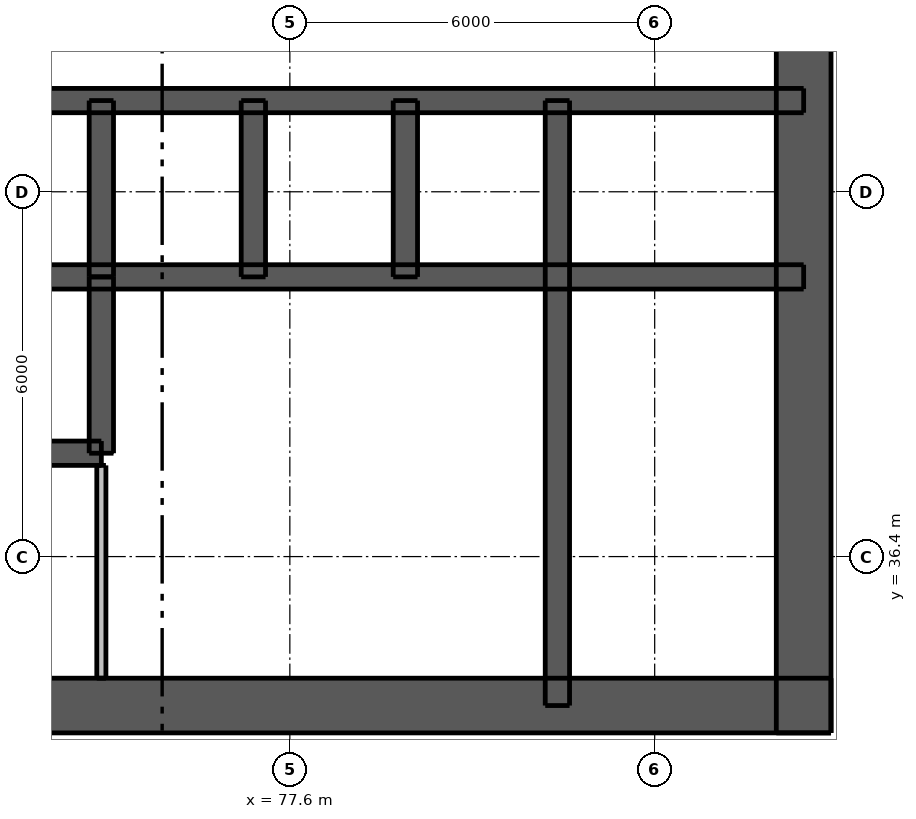
"""IFC4 building model, lengths in metres.
Left out: names, types, materials, properties, quantities, classifications, styles, units other than length and angle.
Written with IfcOpenShell. Run it as: python <this file> out.ifc"""

import sys

from ifc_helpers import new_model, si_unit, direction, frame, frame_2d, origin, place, context, subcontext, project, spatial, rectangle, extrude, element, fill, save


model = new_model("IFC4")
c1 = context("Model", 3, precision=1e-05, world=origin(), true_north=direction((0.0, 1.0)))
c2 = subcontext(c1, "Body", "Model", "MODEL_VIEW")
j1 = project(units=[si_unit("LENGTHUNIT", "METRE"), si_unit("PLANEANGLEUNIT", "RADIAN")], contexts=[c1])
p1 = place(None, origin())
s1 = spatial("IfcSite", under=j1, at=p1, CompositionType="ELEMENT")
p2 = place(p1, origin())
s2 = spatial("IfcBuilding", under=s1, at=p2, CompositionType="ELEMENT")
p3 = place(p2, frame((0.0, 0.0, 23.5)))
s3 = spatial("IfcBuildingStorey", under=s2, at=p3, CompositionType="ELEMENT", Elevation=23.5)
p4 = place(p3, frame((62.5, 33.95, 0.0), z_axis=(0.0, 0.0, 1.0), x_axis=(1.0, 0.0, 0.0)))
e1 = element("IfcWall", 1, at=p4, inside=s3, PredefinedType="SHEAR", context=c2, shape_type="SweptSolid", body=[
    extrude(rectangle(XDim=24.0, YDim=0.9, at=frame_2d((12.0, 0.0))), origin(), (0.0, 0.0, 1.0), 3.05),
])
p5 = place(p4, frame((2.05, 0.0, 0.0)))
e2 = element("IfcOpeningElement", 2, at=p5, cuts=e1, PredefinedType="OPENING", context=c2, shape_type="SweptSolid", body=[
    extrude(rectangle(XDim=1.1, YDim=2.1, at=frame_2d((0.55, 1.05))), frame((0.0, 0.46, 0.0), z_axis=(0.0, -1.0, 0.0), x_axis=(1.0, 0.0, 0.0)), (0.0, 0.0, 1.0), 0.92),
])
p6 = place(p4, frame((20.85, 0.0, 0.0)))
e3 = element("IfcOpeningElement", 3, at=p6, cuts=e1, PredefinedType="OPENING", context=c2, shape_type="SweptSolid", body=[
    extrude(rectangle(XDim=1.1, YDim=2.1, at=frame_2d((0.55, 1.05))), frame((0.0, 0.46, 0.0), z_axis=(0.0, -1.0, 0.0), x_axis=(1.0, 0.0, 0.0)), (0.0, 0.0, 1.0), 0.92),
])
p7 = place(p4, frame((8.0, 0.0, 0.0)))
e4 = element("IfcOpeningElement", 4, at=p7, cuts=e1, PredefinedType="OPENING", context=c2, shape_type="SweptSolid", body=[
    extrude(rectangle(XDim=1.1, YDim=2.1, at=frame_2d((0.55, 1.05))), frame((0.0, 0.46, 0.0), z_axis=(0.0, -1.0, 0.0), x_axis=(1.0, 0.0, 0.0)), (0.0, 0.0, 1.0), 0.92),
])
p8 = place(p4, frame((15.3, 0.0, 0.0)))
e5 = element("IfcOpeningElement", 5, at=p8, cuts=e1, PredefinedType="OPENING", context=c2, shape_type="SweptSolid", body=[
    extrude(rectangle(XDim=0.9, YDim=2.1, at=frame_2d((0.45, 1.05))), frame((0.0, 0.46, 0.0), z_axis=(0.0, -1.0, 0.0), x_axis=(1.0, 0.0, 0.0)), (0.0, 0.0, 1.0), 0.92),
])
p9 = place(p3, frame((86.05, 33.5, 0.0), z_axis=(0.0, 0.0, 1.0), x_axis=(0.0, 1.0, 0.0)))
e6 = element("IfcWall", 6, at=p9, inside=s3, PredefinedType="SHEAR", context=c2, shape_type="SweptSolid", body=[
    extrude(rectangle(XDim=24.0, YDim=0.9, at=frame_2d((12.0, 0.0))), origin(), (0.0, 0.0, 1.0), 3.05),
])
p10 = place(p9, frame((11.2, 0.0, 0.0)))
e7 = element("IfcOpeningElement", 7, at=p10, cuts=e6, PredefinedType="OPENING", context=c2, shape_type="SweptSolid", body=[
    extrude(rectangle(XDim=1.6, YDim=2.1, at=frame_2d((0.8, 1.05))), frame((0.0, 0.46, 0.0), z_axis=(0.0, -1.0, 0.0), x_axis=(1.0, 0.0, 0.0)), (0.0, 0.0, 1.0), 0.92),
])
p11 = place(p3, frame((62.95, 41.0, 0.0), z_axis=(0.0, 0.0, 1.0), x_axis=(1.0, 0.0, 0.0)))
e8 = element("IfcWall", 8, at=p11, inside=s3, PredefinedType="SHEAR", context=c2, shape_type="SweptSolid", body=[
    extrude(rectangle(XDim=23.1, YDim=0.4, at=frame_2d((11.55, 0.0))), origin(), (0.0, 0.0, 1.0), 3.05),
])
p12 = place(p3, frame((62.95, 43.9, 0.0), z_axis=(0.0, 0.0, 1.0), x_axis=(1.0, 0.0, 0.0)))
e9 = element("IfcWall", 9, at=p12, inside=s3, PredefinedType="SHEAR", context=c2, shape_type="SweptSolid", body=[
    extrude(rectangle(XDim=23.1, YDim=0.4, at=frame_2d((11.55, 0.0))), origin(), (0.0, 0.0, 1.0), 3.05),
])
p13 = place(p12, frame((1.7, 0.0, 0.0)))
e10 = element("IfcOpeningElement", 10, at=p13, cuts=e9, PredefinedType="OPENING", context=c2, shape_type="SweptSolid", body=[
    extrude(rectangle(XDim=0.9, YDim=2.1, at=frame_2d((0.45, 1.05))), frame((0.0, 0.21, 0.0), z_axis=(0.0, -1.0, 0.0), x_axis=(1.0, 0.0, 0.0)), (0.0, 0.0, 1.0), 0.42),
])
p14 = place(p12, frame((20.5, 0.0, 0.0)))
e11 = element("IfcOpeningElement", 11, at=p14, cuts=e9, PredefinedType="OPENING", context=c2, shape_type="SweptSolid", body=[
    extrude(rectangle(XDim=0.9, YDim=2.1, at=frame_2d((0.45, 1.05))), frame((0.0, 0.21, 0.0), z_axis=(0.0, -1.0, 0.0), x_axis=(1.0, 0.0, 0.0)), (0.0, 0.0, 1.0), 0.42),
])
p15 = place(p12, frame((4.75, 0.0, 0.0)))
e12 = element("IfcOpeningElement", 12, at=p15, cuts=e9, PredefinedType="OPENING", context=c2, shape_type="SweptSolid", body=[
    extrude(rectangle(XDim=1.1, YDim=2.1, at=frame_2d((0.55, 1.05))), frame((0.0, 0.21, 0.0), z_axis=(0.0, -1.0, 0.0), x_axis=(1.0, 0.0, 0.0)), (0.0, 0.0, 1.0), 0.42),
])
p16 = place(p12, frame((7.25, 0.0, 0.0)))
e13 = element("IfcOpeningElement", 13, at=p16, cuts=e9, PredefinedType="OPENING", context=c2, shape_type="SweptSolid", body=[
    extrude(rectangle(XDim=1.1, YDim=2.1, at=frame_2d((0.55, 1.05))), frame((0.0, 0.21, 0.0), z_axis=(0.0, -1.0, 0.0), x_axis=(1.0, 0.0, 0.0)), (0.0, 0.0, 1.0), 0.42),
])
p17 = place(p12, frame((9.75, 0.0, 0.0)))
e14 = element("IfcOpeningElement", 14, at=p17, cuts=e9, PredefinedType="OPENING", context=c2, shape_type="SweptSolid", body=[
    extrude(rectangle(XDim=1.1, YDim=2.1, at=frame_2d((0.55, 1.05))), frame((0.0, 0.21, 0.0), z_axis=(0.0, -1.0, 0.0), x_axis=(1.0, 0.0, 0.0)), (0.0, 0.0, 1.0), 0.42),
])
p18 = place(p12, frame((12.25, 0.0, 0.0)))
e15 = element("IfcOpeningElement", 15, at=p18, cuts=e9, PredefinedType="OPENING", context=c2, shape_type="SweptSolid", body=[
    extrude(rectangle(XDim=1.1, YDim=2.1, at=frame_2d((0.55, 1.05))), frame((0.0, 0.21, 0.0), z_axis=(0.0, -1.0, 0.0), x_axis=(1.0, 0.0, 0.0)), (0.0, 0.0, 1.0), 0.42),
])
p19 = place(p12, frame((14.75, 0.0, 0.0)))
e16 = element("IfcOpeningElement", 16, at=p19, cuts=e9, PredefinedType="OPENING", context=c2, shape_type="SweptSolid", body=[
    extrude(rectangle(XDim=1.1, YDim=2.1, at=frame_2d((0.55, 1.05))), frame((0.0, 0.21, 0.0), z_axis=(0.0, -1.0, 0.0), x_axis=(1.0, 0.0, 0.0)), (0.0, 0.0, 1.0), 0.42),
])
p20 = place(p12, frame((17.25, 0.0, 0.0)))
e17 = element("IfcOpeningElement", 17, at=p20, cuts=e9, PredefinedType="OPENING", context=c2, shape_type="SweptSolid", body=[
    extrude(rectangle(XDim=1.1, YDim=2.1, at=frame_2d((0.55, 1.05))), frame((0.0, 0.21, 0.0), z_axis=(0.0, -1.0, 0.0), x_axis=(1.0, 0.0, 0.0)), (0.0, 0.0, 1.0), 0.42),
])
p21 = place(p3, frame((82.0, 33.95, 0.0), z_axis=(0.0, 0.0, 1.0), x_axis=(0.0, 1.0, 0.0)))
e18 = element("IfcWall", 18, at=p21, inside=s3, PredefinedType="SHEAR", context=c2, shape_type="SweptSolid", body=[
    extrude(rectangle(XDim=9.95, YDim=0.4, at=frame_2d((4.975, 0.0))), origin(), (0.0, 0.0, 1.0), 3.05),
])
for number, where, z_axis, x_axis in (
    (19, (74.5, 41.0, 0.0), (0.0, 0.0, 1.0), (0.0, 1.0, 0.0)),
    (20, (77.0, 41.0, 0.0), (0.0, 0.0, 1.0), (0.0, 1.0, 0.0)),
    (21, (79.5, 41.0, 0.0), (0.0, 0.0, 1.0), (0.0, 1.0, 0.0)),
):
    element("IfcWall", number, at=place(p3, frame(where, z_axis=z_axis, x_axis=x_axis)), inside=s3, PredefinedType="SHEAR", context=c2, shape_type="SweptSolid", body=[
        extrude(rectangle(XDim=2.9, YDim=0.4, at=frame_2d((1.45, 0.0))), origin(), (0.0, 0.0, 1.0), 3.05),
    ])
p22 = place(p3, frame((67.0, 38.1, 0.0), z_axis=(0.0, 0.0, 1.0), x_axis=(1.0, 0.0, 0.0)))
e22 = element("IfcWall", 22, at=p22, inside=s3, PredefinedType="SHEAR", context=c2, shape_type="SweptSolid", body=[
    extrude(rectangle(XDim=7.5, YDim=0.4, at=frame_2d((3.75, 0.0))), origin(), (0.0, 0.0, 1.0), 3.05),
])
p23 = place(p22, frame((0.7, 0.0, 0.0)))
e23 = element("IfcOpeningElement", 23, at=p23, cuts=e22, PredefinedType="OPENING", context=c2, shape_type="SweptSolid", body=[
    extrude(rectangle(XDim=1.1, YDim=2.1, at=frame_2d((0.55, 1.05))), frame((0.0, 0.21, 0.0), z_axis=(0.0, -1.0, 0.0), x_axis=(1.0, 0.0, 0.0)), (0.0, 0.0, 1.0), 0.42),
])
p24 = place(p22, frame((3.2, 0.0, 0.0)))
e24 = element("IfcOpeningElement", 24, at=p24, cuts=e22, PredefinedType="OPENING", context=c2, shape_type="SweptSolid", body=[
    extrude(rectangle(XDim=1.1, YDim=2.1, at=frame_2d((0.55, 1.05))), frame((0.0, 0.21, 0.0), z_axis=(0.0, -1.0, 0.0), x_axis=(1.0, 0.0, 0.0)), (0.0, 0.0, 1.0), 0.42),
])
p25 = place(p22, frame((5.65, 0.0, 0.0)))
e25 = element("IfcOpeningElement", 25, at=p25, cuts=e22, PredefinedType="OPENING", context=c2, shape_type="SweptSolid", body=[
    extrude(rectangle(XDim=1.2, YDim=2.1, at=frame_2d((0.6, 1.05))), frame((0.0, 0.21, 0.0), z_axis=(0.0, -1.0, 0.0), x_axis=(1.0, 0.0, 0.0)), (0.0, 0.0, 1.0), 0.42),
])
p26 = place(p3, frame((74.5, 38.1, 0.0), z_axis=(0.0, 0.0, 1.0), x_axis=(0.0, 1.0, 0.0)))
e26 = element("IfcWall", 26, at=p26, inside=s3, PredefinedType="SHEAR", context=c2, shape_type="SweptSolid", body=[
    extrude(rectangle(XDim=2.9, YDim=0.4, at=frame_2d((1.45, 0.0))), origin(), (0.0, 0.0, 1.0), 3.05),
])
p27 = place(p3, frame((74.5, 34.4, 0.0), z_axis=(0.0, 0.0, 1.0), x_axis=(0.0, 1.0, 0.0)))
e27 = element("IfcWall", 27, at=p27, inside=s3, PredefinedType="PLUMBINGWALL", context=c2, shape_type="SweptSolid", body=[
    extrude(rectangle(XDim=3.5, YDim=0.15, at=frame_2d((1.75, 0.0))), origin(), (0.0, 0.0, 1.0), 3.05),
])
p28 = place(p6, origin())
e28 = element("IfcDoor", 28, at=p28, inside=s3, OperationType="SINGLE_SWING_RIGHT", PredefinedType="DOOR", context=c2, shape_type="SweptSolid", body=[
    extrude(rectangle(XDim=1.1, YDim=2.1, at=frame_2d((0.55, 1.05))), frame((0.0, 0.438, 0.0), z_axis=(0.0, -1.0, 0.0), x_axis=(1.0, 0.0, 0.0)), (0.0, 0.0, 1.0), 0.05),
])
fill(e3, e28)
p29 = place(p8, origin())
e29 = element("IfcDoor", 29, at=p29, inside=s3, OperationType="SINGLE_SWING_LEFT", PredefinedType="DOOR", context=c2, shape_type="SweptSolid", body=[
    extrude(rectangle(XDim=0.9, YDim=2.1, at=frame_2d((0.45, 1.05))), frame((0.0, 0.438, 0.0), z_axis=(0.0, -1.0, 0.0), x_axis=(1.0, 0.0, 0.0)), (0.0, 0.0, 1.0), 0.05),
])
fill(e5, e29)
p30 = place(p14, origin())
e30 = element("IfcDoor", 30, at=p30, inside=s3, OperationType="SINGLE_SWING_LEFT", PredefinedType="DOOR", context=c2, shape_type="SweptSolid", body=[
    extrude(rectangle(XDim=0.9, YDim=2.1, at=frame_2d((0.45, 1.05))), frame((0.0, -0.138, 0.0), z_axis=(0.0, -1.0, 0.0), x_axis=(1.0, 0.0, 0.0)), (0.0, 0.0, 1.0), 0.05),
])
fill(e11, e30)
p31 = place(p17, origin())
e31 = element("IfcDoor", 31, at=p31, inside=s3, OperationType="DOUBLE_DOOR_SLIDING", PredefinedType="DOOR", context=c2, shape_type="SweptSolid", body=[
    extrude(rectangle(XDim=1.1, YDim=2.1, at=frame_2d((0.55, 1.05))), frame((0.0, 0.025, 0.0), z_axis=(0.0, -1.0, 0.0), x_axis=(1.0, 0.0, 0.0)), (0.0, 0.0, 1.0), 0.05),
])
fill(e14, e31)
p32 = place(p18, origin())
e32 = element("IfcDoor", 32, at=p32, inside=s3, OperationType="DOUBLE_DOOR_SLIDING", PredefinedType="DOOR", context=c2, shape_type="SweptSolid", body=[
    extrude(rectangle(XDim=1.1, YDim=2.1, at=frame_2d((0.55, 1.05))), frame((0.0, 0.025, 0.0), z_axis=(0.0, -1.0, 0.0), x_axis=(1.0, 0.0, 0.0)), (0.0, 0.0, 1.0), 0.05),
])
fill(e15, e32)
p33 = place(p19, origin())
e33 = element("IfcDoor", 33, at=p33, inside=s3, OperationType="DOUBLE_DOOR_SLIDING", PredefinedType="DOOR", context=c2, shape_type="SweptSolid", body=[
    extrude(rectangle(XDim=1.1, YDim=2.1, at=frame_2d((0.55, 1.05))), frame((0.0, 0.025, 0.0), z_axis=(0.0, -1.0, 0.0), x_axis=(1.0, 0.0, 0.0)), (0.0, 0.0, 1.0), 0.05),
])
fill(e16, e33)
p34 = place(p20, origin())
e34 = element("IfcDoor", 34, at=p34, inside=s3, OperationType="DOUBLE_DOOR_SLIDING", PredefinedType="DOOR", context=c2, shape_type="SweptSolid", body=[
    extrude(rectangle(XDim=1.1, YDim=2.1, at=frame_2d((0.55, 1.05))), frame((0.0, 0.025, 0.0), z_axis=(0.0, -1.0, 0.0), x_axis=(1.0, 0.0, 0.0)), (0.0, 0.0, 1.0), 0.05),
])
fill(e17, e34)
p35 = place(p25, origin())
e35 = element("IfcDoor", 35, at=p35, inside=s3, OperationType="DOUBLE_DOOR_SLIDING", PredefinedType="DOOR", context=c2, shape_type="SweptSolid", body=[
    extrude(rectangle(XDim=1.2, YDim=2.1, at=frame_2d((0.6, 1.05))), frame((0.0, 0.025, 0.0), z_axis=(0.0, -1.0, 0.0), x_axis=(1.0, 0.0, 0.0)), (0.0, 0.0, 1.0), 0.05),
])
fill(e25, e35)
save(model, sys.argv[1])
